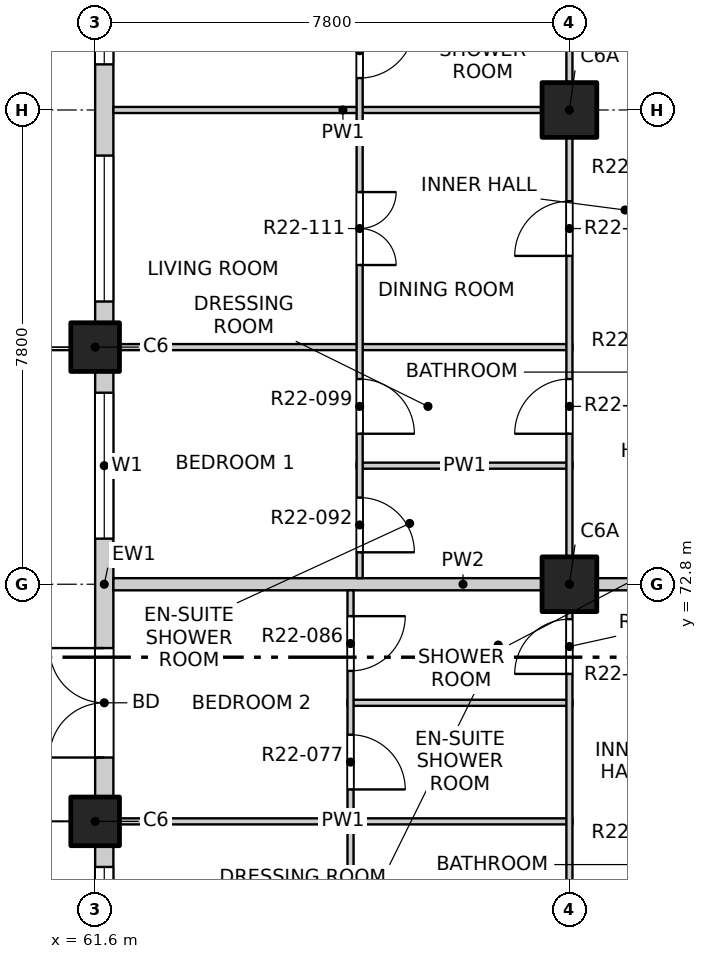
"""IFC4 building model, lengths in metres.
Left out: names, types, materials, properties, quantities, classifications, styles, units other than length and angle.
Written with IfcOpenShell. Run it as: python <this file> out.ifc"""

import sys

from ifc_helpers import new_model, si_unit, direction, frame, frame_2d, origin, origin_2d, place, context, subcontext, project, spatial, rectangle, extrude, element, fill, save


model = new_model("IFC4")
c1 = context("Model", 3, precision=1e-05, world=origin(), true_north=direction((0.0, 1.0)))
c2 = subcontext(c1, "Body", "Model", "MODEL_VIEW")
j1 = project(units=[si_unit("LENGTHUNIT", "METRE"), si_unit("PLANEANGLEUNIT", "RADIAN")], contexts=[c1])
p1 = place(None, origin())
s1 = spatial("IfcSite", under=j1, at=p1, CompositionType="ELEMENT")
p2 = place(p1, origin())
s2 = spatial("IfcBuilding", under=s1, at=p2, CompositionType="ELEMENT")
p3 = place(p2, frame((0.0, 0.0, 224.5)))
s3 = spatial("IfcBuildingStorey", under=s2, at=p3, CompositionType="ELEMENT", Elevation=224.5)
for number, where, z_axis, x_axis in (
    (1, (61.6, 68.9, -0.25), (0.0, 0.0, 1.0), (1.0, 0.0, 0.0)),
    (2, (61.6, 76.7, -0.25), (0.0, 0.0, 1.0), (1.0, 0.0, 0.0)),
):
    element("IfcColumn", number, at=place(p3, frame(where, z_axis=z_axis, x_axis=x_axis)), inside=s3, PredefinedType="COLUMN", context=c2, shape_type="SweptSolid", body=[
        extrude(rectangle(XDim=0.8, YDim=0.8, at=origin_2d()), origin(), (0.0, 0.0, 1.0), 3.4),
    ])
for number, where, z_axis, x_axis in (
    (3, (69.4, 72.8, -0.25), (0.0, 0.0, 1.0), (1.0, 0.0, 0.0)),
    (4, (69.4, 80.6, -0.25), (0.0, 0.0, 1.0), (1.0, 0.0, 0.0)),
):
    element("IfcColumn", number, at=place(p3, frame(where, z_axis=z_axis, x_axis=x_axis)), inside=s3, PredefinedType="COLUMN", context=c2, shape_type="SweptSolid", body=[
        extrude(rectangle(XDim=0.9, YDim=0.9, at=origin_2d()), origin(), (0.0, 0.0, 1.0), 3.4),
    ])
p4 = place(p3, frame((61.75, 61.5, 0.0), z_axis=(0.0, 0.0, 1.0), x_axis=(0.0, 1.0, 0.0)))
e5 = element("IfcWall", 5, at=p4, inside=s3, PredefinedType="SOLIDWALL", context=c2, shape_type="SweptSolid", body=[
    extrude(rectangle(XDim=7.0, YDim=0.3, at=frame_2d((3.5, 0.0))), origin(), (0.0, 0.0, 1.0), 2.7),
])
p5 = place(p4, frame((0.65, 0.0, 0.0)))
e6 = element("IfcOpeningElement", 6, at=p5, cuts=e5, PredefinedType="OPENING", context=c2, shape_type="SweptSolid", body=[
    extrude(rectangle(XDim=1.8, YDim=2.4, at=frame_2d((0.9, 1.2))), frame((0.0, 0.16, 0.0), z_axis=(0.0, -1.0, 0.0), x_axis=(1.0, 0.0, 0.0)), (0.0, 0.0, 1.0), 0.32),
])
p6 = place(p4, frame((4.25, 0.0, 0.9)))
e7 = element("IfcOpeningElement", 7, at=p6, cuts=e5, PredefinedType="OPENING", context=c2, shape_type="SweptSolid", body=[
    extrude(rectangle(XDim=2.4, YDim=1.8, at=frame_2d((1.2, 0.9))), frame((0.0, 0.16, 0.0), z_axis=(0.0, -1.0, 0.0), x_axis=(1.0, 0.0, 0.0)), (0.0, 0.0, 1.0), 0.32),
])
p7 = place(p3, frame((61.75, 69.3, 0.0), z_axis=(0.0, 0.0, 1.0), x_axis=(0.0, 1.0, 0.0)))
e8 = element("IfcWall", 8, at=p7, inside=s3, PredefinedType="SOLIDWALL", context=c2, shape_type="SweptSolid", body=[
    extrude(rectangle(XDim=7.0, YDim=0.3, at=frame_2d((3.5, 0.0))), origin(), (0.0, 0.0, 1.0), 2.7),
])
p8 = place(p7, frame((0.65, 0.0, 0.0)))
e9 = element("IfcOpeningElement", 9, at=p8, cuts=e8, PredefinedType="OPENING", context=c2, shape_type="SweptSolid", body=[
    extrude(rectangle(XDim=1.8, YDim=2.4, at=frame_2d((0.9, 1.2))), frame((0.0, 0.16, 0.0), z_axis=(0.0, -1.0, 0.0), x_axis=(1.0, 0.0, 0.0)), (0.0, 0.0, 1.0), 0.32),
])
p9 = place(p7, frame((4.25, 0.0, 0.9)))
e10 = element("IfcOpeningElement", 10, at=p9, cuts=e8, PredefinedType="OPENING", context=c2, shape_type="SweptSolid", body=[
    extrude(rectangle(XDim=2.4, YDim=1.8, at=frame_2d((1.2, 0.9))), frame((0.0, 0.16, 0.0), z_axis=(0.0, -1.0, 0.0), x_axis=(1.0, 0.0, 0.0)), (0.0, 0.0, 1.0), 0.32),
])
p10 = place(p3, frame((61.75, 77.1, 0.0), z_axis=(0.0, 0.0, 1.0), x_axis=(0.0, 1.0, 0.0)))
e11 = element("IfcWall", 11, at=p10, inside=s3, PredefinedType="SOLIDWALL", context=c2, shape_type="SweptSolid", body=[
    extrude(rectangle(XDim=7.4, YDim=0.3, at=frame_2d((3.7, 0.0))), origin(), (0.0, 0.0, 1.0), 2.7),
])
p11 = place(p10, frame((0.35, 0.0, 0.9)))
e12 = element("IfcOpeningElement", 12, at=p11, cuts=e11, PredefinedType="OPENING", context=c2, shape_type="SweptSolid", body=[
    extrude(rectangle(XDim=2.4, YDim=1.8, at=frame_2d((1.2, 0.9))), frame((0.0, 0.16, 0.0), z_axis=(0.0, -1.0, 0.0), x_axis=(1.0, 0.0, 0.0)), (0.0, 0.0, 1.0), 0.32),
])
p12 = place(p10, frame((4.25, 0.0, 0.9)))
e13 = element("IfcOpeningElement", 13, at=p12, cuts=e11, PredefinedType="OPENING", context=c2, shape_type="SweptSolid", body=[
    extrude(rectangle(XDim=2.4, YDim=1.8, at=frame_2d((1.2, 0.9))), frame((0.0, 0.16, 0.0), z_axis=(0.0, -1.0, 0.0), x_axis=(1.0, 0.0, 0.0)), (0.0, 0.0, 1.0), 0.32),
])
p13 = place(p3, frame((61.9, 68.9, 0.0), z_axis=(0.0, 0.0, 1.0), x_axis=(1.0, 0.0, 0.0)))
e14 = element("IfcWall", 14, at=p13, inside=s3, PredefinedType="PARTITIONING", context=c2, shape_type="SweptSolid", body=[
    extrude(rectangle(XDim=7.55, YDim=0.1, at=frame_2d((3.775, 0.0))), origin(), (0.0, 0.0, 1.0), 2.55),
])
p14 = place(p3, frame((65.75, 70.85, 0.0), z_axis=(0.0, 0.0, 1.0), x_axis=(1.0, 0.0, 0.0)))
e15 = element("IfcWall", 15, at=p14, inside=s3, PredefinedType="PARTITIONING", context=c2, shape_type="SweptSolid", body=[
    extrude(rectangle(XDim=3.7, YDim=0.1, at=frame_2d((1.85, 0.0))), origin(), (0.0, 0.0, 1.0), 3.15),
])
p15 = place(p3, frame((61.9, 72.8, 0.0), z_axis=(0.0, 0.0, 1.0), x_axis=(1.0, 0.0, 0.0)))
e16 = element("IfcWall", 16, at=p15, inside=s3, PredefinedType="PARTITIONING", context=c2, shape_type="SweptSolid", body=[
    extrude(rectangle(XDim=11.5, YDim=0.2, at=frame_2d((5.75, 0.0))), origin(), (0.0, 0.0, 1.0), 3.15),
])
p16 = place(p3, frame((65.9, 74.75, 0.0), z_axis=(0.0, 0.0, 1.0), x_axis=(1.0, 0.0, 0.0)))
e17 = element("IfcWall", 17, at=p16, inside=s3, PredefinedType="PARTITIONING", context=c2, shape_type="SweptSolid", body=[
    extrude(rectangle(XDim=3.55, YDim=0.1, at=frame_2d((1.775, 0.0))), origin(), (0.0, 0.0, 1.0), 3.15),
])
p17 = place(p3, frame((61.9, 76.7, 0.0), z_axis=(0.0, 0.0, 1.0), x_axis=(1.0, 0.0, 0.0)))
e18 = element("IfcWall", 18, at=p17, inside=s3, PredefinedType="PARTITIONING", context=c2, shape_type="SweptSolid", body=[
    extrude(rectangle(XDim=7.55, YDim=0.1, at=frame_2d((3.775, 0.0))), origin(), (0.0, 0.0, 1.0), 2.55),
])
p18 = place(p3, frame((61.9, 80.6, 0.0), z_axis=(0.0, 0.0, 1.0), x_axis=(1.0, 0.0, 0.0)))
e19 = element("IfcWall", 19, at=p18, inside=s3, PredefinedType="PARTITIONING", context=c2, shape_type="SweptSolid", body=[
    extrude(rectangle(XDim=7.55, YDim=0.1, at=frame_2d((3.775, 0.0))), origin(), (0.0, 0.0, 1.0), 3.15),
])
p19 = place(p3, frame((65.8, 61.2, 0.0), z_axis=(0.0, 0.0, 1.0), x_axis=(0.0, 1.0, 0.0)))
e20 = element("IfcWall", 20, at=p19, inside=s3, PredefinedType="PARTITIONING", context=c2, shape_type="SweptSolid", body=[
    extrude(rectangle(XDim=11.5, YDim=0.1, at=frame_2d((5.75, 0.0))), origin(), (0.0, 0.0, 1.0), 3.15),
])
p20 = place(p19, frame((0.425, 0.0, 0.0)))
e21 = element("IfcOpeningElement", 21, at=p20, cuts=e20, PredefinedType="OPENING", context=c2, shape_type="SweptSolid", body=[
    extrude(rectangle(XDim=0.9, YDim=2.1, at=frame_2d((0.45, 1.05))), frame((0.0, 0.06, 0.0), z_axis=(0.0, -1.0, 0.0), x_axis=(1.0, 0.0, 0.0)), (0.0, 0.0, 1.0), 0.12),
])
p21 = place(p19, frame((2.375, 0.0, 0.0)))
e22 = element("IfcOpeningElement", 22, at=p21, cuts=e20, PredefinedType="OPENING", context=c2, shape_type="SweptSolid", body=[
    extrude(rectangle(XDim=0.9, YDim=2.1, at=frame_2d((0.45, 1.05))), frame((0.0, 0.06, 0.0), z_axis=(0.0, -1.0, 0.0), x_axis=(1.0, 0.0, 0.0)), (0.0, 0.0, 1.0), 0.12),
])
p22 = place(p19, frame((5.15, 0.0, 0.0)))
e23 = element("IfcOpeningElement", 23, at=p22, cuts=e20, PredefinedType="OPENING", context=c2, shape_type="SweptSolid", body=[
    extrude(rectangle(XDim=1.2, YDim=2.1, at=frame_2d((0.6, 1.05))), frame((0.0, 0.06, 0.0), z_axis=(0.0, -1.0, 0.0), x_axis=(1.0, 0.0, 0.0)), (0.0, 0.0, 1.0), 0.12),
])
p23 = place(p19, frame((8.225, 0.0, 0.0)))
e24 = element("IfcOpeningElement", 24, at=p23, cuts=e20, PredefinedType="OPENING", context=c2, shape_type="SweptSolid", body=[
    extrude(rectangle(XDim=0.9, YDim=2.1, at=frame_2d((0.45, 1.05))), frame((0.0, 0.06, 0.0), z_axis=(0.0, -1.0, 0.0), x_axis=(1.0, 0.0, 0.0)), (0.0, 0.0, 1.0), 0.12),
])
p24 = place(p19, frame((10.175, 0.0, 0.0)))
e25 = element("IfcOpeningElement", 25, at=p24, cuts=e20, PredefinedType="OPENING", context=c2, shape_type="SweptSolid", body=[
    extrude(rectangle(XDim=0.9, YDim=2.1, at=frame_2d((0.45, 1.05))), frame((0.0, 0.06, 0.0), z_axis=(0.0, -1.0, 0.0), x_axis=(1.0, 0.0, 0.0)), (0.0, 0.0, 1.0), 0.12),
])
p25 = place(p3, frame((65.95, 72.9, 0.0), z_axis=(0.0, 0.0, 1.0), x_axis=(0.0, 1.0, 0.0)))
e26 = element("IfcWall", 26, at=p25, inside=s3, PredefinedType="PARTITIONING", context=c2, shape_type="SweptSolid", body=[
    extrude(rectangle(XDim=15.2, YDim=0.1, at=frame_2d((7.6, 0.0))), origin(), (0.0, 0.0, 1.0), 3.15),
])
p26 = place(p25, frame((0.425, 0.0, 0.0)))
e27 = element("IfcOpeningElement", 27, at=p26, cuts=e26, PredefinedType="OPENING", context=c2, shape_type="SweptSolid", body=[
    extrude(rectangle(XDim=0.9, YDim=2.1, at=frame_2d((0.45, 1.05))), frame((0.0, 0.06, 0.0), z_axis=(0.0, -1.0, 0.0), x_axis=(1.0, 0.0, 0.0)), (0.0, 0.0, 1.0), 0.12),
])
p27 = place(p25, frame((2.375, 0.0, 0.0)))
e28 = element("IfcOpeningElement", 28, at=p27, cuts=e26, PredefinedType="OPENING", context=c2, shape_type="SweptSolid", body=[
    extrude(rectangle(XDim=0.9, YDim=2.1, at=frame_2d((0.45, 1.05))), frame((0.0, 0.06, 0.0), z_axis=(0.0, -1.0, 0.0), x_axis=(1.0, 0.0, 0.0)), (0.0, 0.0, 1.0), 0.12),
])
p28 = place(p25, frame((5.15, 0.0, 0.0)))
e29 = element("IfcOpeningElement", 29, at=p28, cuts=e26, PredefinedType="OPENING", context=c2, shape_type="SweptSolid", body=[
    extrude(rectangle(XDim=1.2, YDim=2.1, at=frame_2d((0.6, 1.05))), frame((0.0, 0.06, 0.0), z_axis=(0.0, -1.0, 0.0), x_axis=(1.0, 0.0, 0.0)), (0.0, 0.0, 1.0), 0.12),
])
p29 = place(p25, frame((8.225, 0.0, 0.0)))
e30 = element("IfcOpeningElement", 30, at=p29, cuts=e26, PredefinedType="OPENING", context=c2, shape_type="SweptSolid", body=[
    extrude(rectangle(XDim=0.9, YDim=2.1, at=frame_2d((0.45, 1.05))), frame((0.0, 0.06, 0.0), z_axis=(0.0, -1.0, 0.0), x_axis=(1.0, 0.0, 0.0)), (0.0, 0.0, 1.0), 0.12),
])
p30 = place(p25, frame((10.175, 0.0, 0.0)))
e31 = element("IfcOpeningElement", 31, at=p30, cuts=e26, PredefinedType="OPENING", context=c2, shape_type="SweptSolid", body=[
    extrude(rectangle(XDim=0.9, YDim=2.1, at=frame_2d((0.45, 1.05))), frame((0.0, 0.06, 0.0), z_axis=(0.0, -1.0, 0.0), x_axis=(1.0, 0.0, 0.0)), (0.0, 0.0, 1.0), 0.12),
])
p31 = place(p25, frame((12.95, 0.0, 0.0)))
e32 = element("IfcOpeningElement", 32, at=p31, cuts=e26, PredefinedType="OPENING", context=c2, shape_type="SweptSolid", body=[
    extrude(rectangle(XDim=1.2, YDim=2.1, at=frame_2d((0.6, 1.05))), frame((0.0, 0.06, 0.0), z_axis=(0.0, -1.0, 0.0), x_axis=(1.0, 0.0, 0.0)), (0.0, 0.0, 1.0), 0.12),
])
p32 = place(p3, frame((69.4, 41.9, 0.0), z_axis=(0.0, 0.0, 1.0), x_axis=(0.0, 1.0, 0.0)))
e33 = element("IfcWall", 33, at=p32, inside=s3, PredefinedType="PARTITIONING", context=c2, shape_type="SweptSolid", body=[
    extrude(rectangle(XDim=46.2, YDim=0.1, at=frame_2d((23.1, 0.0))), origin(), (0.0, 0.0, 1.0), 3.15),
])
p33 = place(p32, frame((1.2, 0.0, 0.0)))
e34 = element("IfcOpeningElement", 34, at=p33, cuts=e33, PredefinedType="OPENING", context=c2, shape_type="SweptSolid", body=[
    extrude(rectangle(XDim=0.9, YDim=2.1, at=frame_2d((0.45, 1.05))), frame((0.0, 0.06, 0.0), z_axis=(0.0, -1.0, 0.0), x_axis=(1.0, 0.0, 0.0)), (0.0, 0.0, 1.0), 0.12),
])
p34 = place(p32, frame((5.1, 0.0, 0.0)))
e35 = element("IfcOpeningElement", 35, at=p34, cuts=e33, PredefinedType="OPENING", context=c2, shape_type="SweptSolid", body=[
    extrude(rectangle(XDim=0.9, YDim=2.1, at=frame_2d((0.45, 1.05))), frame((0.0, 0.06, 0.0), z_axis=(0.0, -1.0, 0.0), x_axis=(1.0, 0.0, 0.0)), (0.0, 0.0, 1.0), 0.12),
])
p35 = place(p32, frame((9.0, 0.0, 0.0)))
e36 = element("IfcOpeningElement", 36, at=p35, cuts=e33, PredefinedType="OPENING", context=c2, shape_type="SweptSolid", body=[
    extrude(rectangle(XDim=0.9, YDim=2.1, at=frame_2d((0.45, 1.05))), frame((0.0, 0.06, 0.0), z_axis=(0.0, -1.0, 0.0), x_axis=(1.0, 0.0, 0.0)), (0.0, 0.0, 1.0), 0.12),
])
p36 = place(p32, frame((13.85, 0.0, 0.0)))
e37 = element("IfcOpeningElement", 37, at=p36, cuts=e33, PredefinedType="OPENING", context=c2, shape_type="SweptSolid", body=[
    extrude(rectangle(XDim=0.9, YDim=2.1, at=frame_2d((0.45, 1.05))), frame((0.0, 0.06, 0.0), z_axis=(0.0, -1.0, 0.0), x_axis=(1.0, 0.0, 0.0)), (0.0, 0.0, 1.0), 0.12),
])
p37 = place(p32, frame((17.775, 0.0, 0.0)))
e38 = element("IfcOpeningElement", 38, at=p37, cuts=e33, PredefinedType="OPENING", context=c2, shape_type="SweptSolid", body=[
    extrude(rectangle(XDim=0.9, YDim=2.1, at=frame_2d((0.45, 1.05))), frame((0.0, 0.06, 0.0), z_axis=(0.0, -1.0, 0.0), x_axis=(1.0, 0.0, 0.0)), (0.0, 0.0, 1.0), 0.12),
])
p38 = place(p32, frame((21.625, 0.0, 0.0)))
e39 = element("IfcOpeningElement", 39, at=p38, cuts=e33, PredefinedType="OPENING", context=c2, shape_type="SweptSolid", body=[
    extrude(rectangle(XDim=0.9, YDim=2.1, at=frame_2d((0.45, 1.05))), frame((0.0, 0.06, 0.0), z_axis=(0.0, -1.0, 0.0), x_axis=(1.0, 0.0, 0.0)), (0.0, 0.0, 1.0), 0.12),
])
p39 = place(p32, frame((24.6, 0.0, 0.0)))
e40 = element("IfcOpeningElement", 40, at=p39, cuts=e33, PredefinedType="OPENING", context=c2, shape_type="SweptSolid", body=[
    extrude(rectangle(XDim=0.9, YDim=2.1, at=frame_2d((0.45, 1.05))), frame((0.0, 0.06, 0.0), z_axis=(0.0, -1.0, 0.0), x_axis=(1.0, 0.0, 0.0)), (0.0, 0.0, 1.0), 0.12),
])
p40 = place(p32, frame((29.425, 0.0, 0.0)))
e41 = element("IfcOpeningElement", 41, at=p40, cuts=e33, PredefinedType="OPENING", context=c2, shape_type="SweptSolid", body=[
    extrude(rectangle(XDim=0.9, YDim=2.1, at=frame_2d((0.45, 1.05))), frame((0.0, 0.06, 0.0), z_axis=(0.0, -1.0, 0.0), x_axis=(1.0, 0.0, 0.0)), (0.0, 0.0, 1.0), 0.12),
])
p41 = place(p32, frame((33.375, 0.0, 0.0)))
e42 = element("IfcOpeningElement", 42, at=p41, cuts=e33, PredefinedType="OPENING", context=c2, shape_type="SweptSolid", body=[
    extrude(rectangle(XDim=0.9, YDim=2.1, at=frame_2d((0.45, 1.05))), frame((0.0, 0.06, 0.0), z_axis=(0.0, -1.0, 0.0), x_axis=(1.0, 0.0, 0.0)), (0.0, 0.0, 1.0), 0.12),
])
p42 = place(p32, frame((36.3, 0.0, 0.0)))
e43 = element("IfcOpeningElement", 43, at=p42, cuts=e33, PredefinedType="OPENING", context=c2, shape_type="SweptSolid", body=[
    extrude(rectangle(XDim=0.9, YDim=2.1, at=frame_2d((0.45, 1.05))), frame((0.0, 0.06, 0.0), z_axis=(0.0, -1.0, 0.0), x_axis=(1.0, 0.0, 0.0)), (0.0, 0.0, 1.0), 0.12),
])
p43 = place(p32, frame((41.175, 0.0, 0.0)))
e44 = element("IfcOpeningElement", 44, at=p43, cuts=e33, PredefinedType="OPENING", context=c2, shape_type="SweptSolid", body=[
    extrude(rectangle(XDim=0.9, YDim=2.1, at=frame_2d((0.45, 1.05))), frame((0.0, 0.06, 0.0), z_axis=(0.0, -1.0, 0.0), x_axis=(1.0, 0.0, 0.0)), (0.0, 0.0, 1.0), 0.12),
])
p44 = place(p32, frame((44.1, 0.0, 0.0)))
e45 = element("IfcOpeningElement", 45, at=p44, cuts=e33, PredefinedType="OPENING", context=c2, shape_type="SweptSolid", body=[
    extrude(rectangle(XDim=0.9, YDim=2.1, at=frame_2d((0.45, 1.05))), frame((0.0, 0.06, 0.0), z_axis=(0.0, -1.0, 0.0), x_axis=(1.0, 0.0, 0.0)), (0.0, 0.0, 1.0), 0.12),
])
p45 = place(p6, origin())
e46 = element("IfcWindow", 46, at=p45, inside=s3, PartitioningType="DOUBLE_PANEL_VERTICAL", PredefinedType="WINDOW", context=c2, shape_type="SweptSolid", body=[
    extrude(rectangle(XDim=2.4, YDim=1.8, at=frame_2d((1.2, 0.9))), frame((0.0, 0.03, 0.0), z_axis=(0.0, -1.0, 0.0), x_axis=(1.0, 0.0, 0.0)), (0.0, 0.0, 1.0), 0.06),
])
fill(e7, e46)
p46 = place(p8, origin())
e47 = element("IfcDoor", 47, at=p46, inside=s3, OperationType="DOUBLE_DOOR_SINGLE_SWING", PredefinedType="DOOR", context=c2, shape_type="SweptSolid", body=[
    extrude(rectangle(XDim=1.8, YDim=2.4, at=frame_2d((0.9, 1.2))), frame((0.0, 0.025, 0.0), z_axis=(0.0, -1.0, 0.0), x_axis=(1.0, 0.0, 0.0)), (0.0, 0.0, 1.0), 0.05),
])
fill(e9, e47)
p47 = place(p9, origin())
e48 = element("IfcWindow", 48, at=p47, inside=s3, PartitioningType="DOUBLE_PANEL_VERTICAL", PredefinedType="WINDOW", context=c2, shape_type="SweptSolid", body=[
    extrude(rectangle(XDim=2.4, YDim=1.8, at=frame_2d((1.2, 0.9))), frame((0.0, 0.03, 0.0), z_axis=(0.0, -1.0, 0.0), x_axis=(1.0, 0.0, 0.0)), (0.0, 0.0, 1.0), 0.06),
])
fill(e10, e48)
p48 = place(p11, origin())
e49 = element("IfcWindow", 49, at=p48, inside=s3, PartitioningType="DOUBLE_PANEL_VERTICAL", PredefinedType="WINDOW", context=c2, shape_type="SweptSolid", body=[
    extrude(rectangle(XDim=2.4, YDim=1.8, at=frame_2d((1.2, 0.9))), frame((0.0, 0.03, 0.0), z_axis=(0.0, -1.0, 0.0), x_axis=(1.0, 0.0, 0.0)), (0.0, 0.0, 1.0), 0.06),
])
fill(e12, e49)
p49 = place(p12, origin())
e50 = element("IfcWindow", 50, at=p49, inside=s3, PartitioningType="DOUBLE_PANEL_VERTICAL", PredefinedType="WINDOW", context=c2, shape_type="SweptSolid", body=[
    extrude(rectangle(XDim=2.4, YDim=1.8, at=frame_2d((1.2, 0.9))), frame((0.0, 0.03, 0.0), z_axis=(0.0, -1.0, 0.0), x_axis=(1.0, 0.0, 0.0)), (0.0, 0.0, 1.0), 0.06),
])
fill(e13, e50)
p50 = place(p23, origin())
e51 = element("IfcDoor", 51, at=p50, inside=s3, OperationType="SINGLE_SWING_RIGHT", PredefinedType="DOOR", context=c2, shape_type="SweptSolid", body=[
    extrude(rectangle(XDim=0.9, YDim=2.1, at=frame_2d((0.45, 1.05))), frame((0.0, 0.025, 0.0), z_axis=(0.0, -1.0, 0.0), x_axis=(1.0, 0.0, 0.0)), (0.0, 0.0, 1.0), 0.05),
])
fill(e24, e51)
p51 = place(p40, origin())
e52 = element("IfcDoor", 52, at=p51, inside=s3, OperationType="SINGLE_SWING_LEFT", PredefinedType="DOOR", context=c2, shape_type="SweptSolid", body=[
    extrude(rectangle(XDim=0.9, YDim=2.1, at=frame_2d((0.45, 1.05))), frame((0.0, 0.025, 0.0), z_axis=(0.0, -1.0, 0.0), x_axis=(1.0, 0.0, 0.0)), (0.0, 0.0, 1.0), 0.05),
])
fill(e41, e52)
p52 = place(p24, origin())
e53 = element("IfcDoor", 53, at=p52, inside=s3, OperationType="SINGLE_SWING_LEFT", PredefinedType="DOOR", context=c2, shape_type="SweptSolid", body=[
    extrude(rectangle(XDim=0.9, YDim=2.1, at=frame_2d((0.45, 1.05))), frame((0.0, 0.025, 0.0), z_axis=(0.0, -1.0, 0.0), x_axis=(1.0, 0.0, 0.0)), (0.0, 0.0, 1.0), 0.05),
])
fill(e25, e53)
p53 = place(p26, origin())
e54 = element("IfcDoor", 54, at=p53, inside=s3, OperationType="SINGLE_SWING_RIGHT", PredefinedType="DOOR", context=c2, shape_type="SweptSolid", body=[
    extrude(rectangle(XDim=0.9, YDim=2.1, at=frame_2d((0.45, 1.05))), frame((0.0, 0.025, 0.0), z_axis=(0.0, -1.0, 0.0), x_axis=(1.0, 0.0, 0.0)), (0.0, 0.0, 1.0), 0.05),
])
fill(e27, e54)
p54 = place(p27, origin())
e55 = element("IfcDoor", 55, at=p54, inside=s3, OperationType="SINGLE_SWING_RIGHT", PredefinedType="DOOR", context=c2, shape_type="SweptSolid", body=[
    extrude(rectangle(XDim=0.9, YDim=2.1, at=frame_2d((0.45, 1.05))), frame((0.0, 0.025, 0.0), z_axis=(0.0, -1.0, 0.0), x_axis=(1.0, 0.0, 0.0)), (0.0, 0.0, 1.0), 0.05),
])
fill(e28, e55)
p55 = place(p41, origin())
e56 = element("IfcDoor", 56, at=p55, inside=s3, OperationType="SINGLE_SWING_LEFT", PredefinedType="DOOR", context=c2, shape_type="SweptSolid", body=[
    extrude(rectangle(XDim=0.9, YDim=2.1, at=frame_2d((0.45, 1.05))), frame((0.0, 0.025, 0.0), z_axis=(0.0, -1.0, 0.0), x_axis=(1.0, 0.0, 0.0)), (0.0, 0.0, 1.0), 0.05),
])
fill(e42, e56)
p56 = place(p28, origin())
e57 = element("IfcDoor", 57, at=p56, inside=s3, OperationType="DOUBLE_DOOR_SINGLE_SWING", PredefinedType="DOOR", context=c2, shape_type="SweptSolid", body=[
    extrude(rectangle(XDim=1.2, YDim=2.1, at=frame_2d((0.6, 1.05))), frame((0.0, 0.025, 0.0), z_axis=(0.0, -1.0, 0.0), x_axis=(1.0, 0.0, 0.0)), (0.0, 0.0, 1.0), 0.05),
])
fill(e29, e57)
p57 = place(p42, origin())
e58 = element("IfcDoor", 58, at=p57, inside=s3, OperationType="SINGLE_SWING_LEFT", PredefinedType="DOOR", context=c2, shape_type="SweptSolid", body=[
    extrude(rectangle(XDim=0.9, YDim=2.1, at=frame_2d((0.45, 1.05))), frame((0.0, 0.025, 0.0), z_axis=(0.0, -1.0, 0.0), x_axis=(1.0, 0.0, 0.0)), (0.0, 0.0, 1.0), 0.05),
])
fill(e43, e58)
p58 = place(p29, origin())
e59 = element("IfcDoor", 59, at=p58, inside=s3, OperationType="SINGLE_SWING_LEFT", PredefinedType="DOOR", context=c2, shape_type="SweptSolid", body=[
    extrude(rectangle(XDim=0.9, YDim=2.1, at=frame_2d((0.45, 1.05))), frame((0.0, 0.025, 0.0), z_axis=(0.0, -1.0, 0.0), x_axis=(1.0, 0.0, 0.0)), (0.0, 0.0, 1.0), 0.05),
])
fill(e30, e59)
save(model, sys.argv[1])
